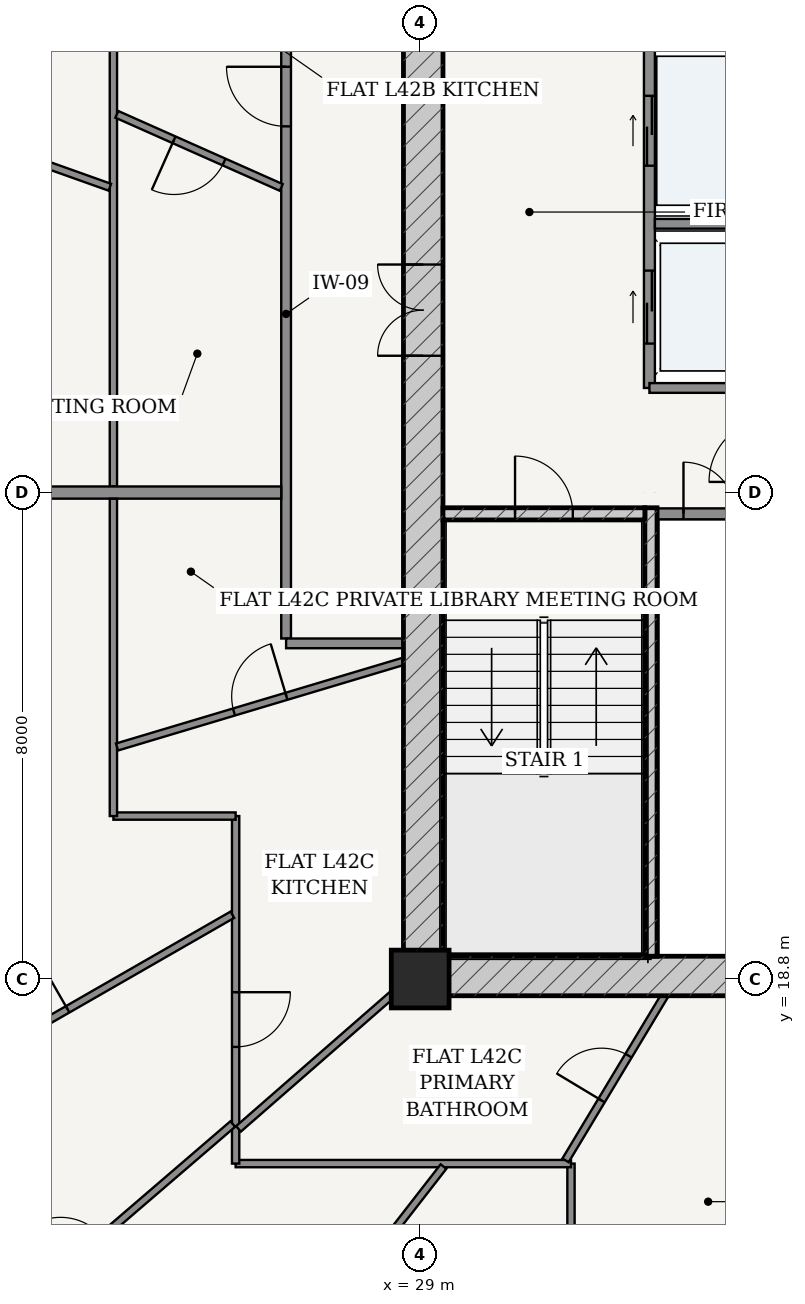
"""IFC4 building model, lengths in metres.
Left out: names, types, materials, properties, quantities, classifications, styles, units other than length and angle.
Written with IfcOpenShell. Run it as: python <this file> out.ifc"""

import sys

from ifc_helpers import new_model, si_unit, direction, frame, frame_2d, origin, origin_2d, place, context, subcontext, project, spatial, rectangle, extrude, source, transform, mapped, element, fill, save


model = new_model("IFC4")
c1 = context("Model", 3, precision=1e-05, world=origin(), true_north=direction((-0.2419218956, 0.970295726276)))
c2 = subcontext(c1, "Body", "Model", "MODEL_VIEW")
j1 = project(units=[si_unit("LENGTHUNIT", "METRE"), si_unit("PLANEANGLEUNIT", "RADIAN")], contexts=[c1])
p1 = place(None, origin())
s1 = spatial("IfcSite", under=j1, at=p1, CompositionType="ELEMENT")
p2 = place(p1, origin())
s2 = spatial("IfcBuilding", under=s1, at=p2, CompositionType="ELEMENT")
p3 = place(p2, frame((0.0, 0.0, 160.6)))
s3 = spatial("IfcBuildingStorey", under=s2, at=p3, CompositionType="ELEMENT", Elevation=160.6)
p4 = place(p3, frame((29.0, 18.8, 0.0), z_axis=(0.0, 0.0, 1.0), x_axis=(1.0, 0.0, 0.0)))
e1 = element("IfcColumn", 1, at=p4, inside=s3, PredefinedType="COLUMN", context=c2, shape_type="SweptSolid", body=[
    extrude(rectangle(XDim=0.95, YDim=0.95, at=origin_2d()), origin(), (0.0, 0.0, 1.0), 3.6),
])
p5 = place(p3, frame((28.725, 18.85, 0.0), z_axis=(0.0, 0.0, 1.0), x_axis=(1.0, 0.0, 0.0)))
e2 = element("IfcWall", 2, at=p5, inside=s3, PredefinedType="SHEAR", context=c2, shape_type="SweptSolid", body=[
    extrude(rectangle(XDim=18.55, YDim=0.65, at=frame_2d((9.275, 0.0))), origin(), (0.0, 0.0, 1.0), 3.33),
])
p6 = place(p5, frame((8.85, 0.0, 0.0)))
e3 = element("IfcOpeningElement", 3, at=p6, cuts=e2, PredefinedType="OPENING", context=c2, shape_type="SweptSolid", body=[
    extrude(rectangle(XDim=0.85, YDim=2.1, at=frame_2d((0.425, 1.05))), frame((0.0, 0.335, 0.0), z_axis=(0.0, -1.0, 0.0), x_axis=(1.0, 0.0, 0.0)), (0.0, 0.0, 1.0), 0.67),
])
p7 = place(p3, frame((29.05, 19.175, 0.0), z_axis=(0.0, 0.0, 1.0), x_axis=(0.0, 1.0, 0.0)))
e4 = element("IfcWall", 4, at=p7, inside=s3, PredefinedType="SHEAR", context=c2, shape_type="SweptSolid", body=[
    extrude(rectangle(XDim=15.25, YDim=0.65, at=frame_2d((7.625, 0.0))), origin(), (0.0, 0.0, 1.0), 3.33),
])
p8 = place(p7, frame((9.875, 0.0, 0.0)))
e5 = element("IfcOpeningElement", 5, at=p8, cuts=e4, PredefinedType="OPENING", context=c2, shape_type="SweptSolid", body=[
    extrude(rectangle(XDim=1.5, YDim=2.2, at=frame_2d((0.75, 1.1))), frame((0.0, 0.335, 0.0), z_axis=(0.0, -1.0, 0.0), x_axis=(1.0, 0.0, 0.0)), (0.0, 0.0, 1.0), 0.67),
])
p9 = place(p3, frame((32.795, 19.175, 0.0), z_axis=(0.0, 0.0, 1.0), x_axis=(0.0, 1.0, 0.0)))
e6 = element("IfcWall", 6, at=p9, inside=s3, PredefinedType="SOLIDWALL", context=c2, shape_type="SweptSolid", body=[
    extrude(rectangle(XDim=7.375, YDim=0.2, at=frame_2d((3.688, 0.0))), origin(), (0.0, 0.0, 1.0), 3.33),
])
p10 = place(p3, frame((29.375, 26.45, 0.0), z_axis=(0.0, 0.0, 1.0), x_axis=(1.0, 0.0, 0.0)))
e7 = element("IfcWall", 7, at=p10, inside=s3, PredefinedType="SOLIDWALL", context=c2, shape_type="SweptSolid", body=[
    extrude(rectangle(XDim=3.32, YDim=0.2, at=frame_2d((1.66, 0.0))), origin(), (0.0, 0.0, 1.0), 3.33),
])
p11 = place(p10, frame((1.185, 0.0, 0.0)))
e8 = element("IfcOpeningElement", 8, at=p11, cuts=e7, PredefinedType="OPENING", context=c2, shape_type="SweptSolid", body=[
    extrude(rectangle(XDim=0.95, YDim=2.15, at=frame_2d((0.475, 1.075))), frame((0.0, 0.11, 0.0), z_axis=(0.0, -1.0, 0.0), x_axis=(1.0, 0.0, 0.0)), (0.0, 0.0, 1.0), 0.22),
])
p12 = place(p3, frame((32.9, 26.45, 0.0), z_axis=(0.0, 0.0, 1.0), x_axis=(1.0, 0.0, 0.0)))
e9 = element("IfcWall", 9, at=p12, inside=s3, PredefinedType="PARTITIONING", context=c2, shape_type="SweptSolid", body=[
    extrude(rectangle(XDim=1.71, YDim=0.18, at=frame_2d((0.855, 0.0))), origin(), (0.0, 0.0, 1.0), 3.33),
])
p13 = place(p12, frame((0.43, 0.0, 0.0)))
e10 = element("IfcOpeningElement", 10, at=p13, cuts=e9, PredefinedType="OPENING", context=c2, shape_type="SweptSolid", body=[
    extrude(rectangle(XDim=0.85, YDim=2.1, at=frame_2d((0.425, 1.05))), frame((0.0, 0.1, 0.0), z_axis=(0.0, -1.0, 0.0), x_axis=(1.0, 0.0, 0.0)), (0.0, 0.0, 1.0), 0.2),
])
p14 = place(p3, frame((32.77, 28.52, 0.0), z_axis=(0.0, 0.0, 1.0), x_axis=(0.0, 1.0, 0.0)))
e11 = element("IfcWall", 11, at=p14, inside=s3, PredefinedType="PARTITIONING", context=c2, shape_type="SweptSolid", body=[
    extrude(rectangle(XDim=5.905, YDim=0.18, at=frame_2d((2.953, 0.0))), origin(), (0.0, 0.0, 1.0), 3.33),
])
p15 = place(p14, frame((3.655, 0.0, 0.0)))
e12 = element("IfcOpeningElement", 12, at=p15, cuts=e11, PredefinedType="OPENING", context=c2, shape_type="SweptSolid", body=[
    extrude(rectangle(XDim=1.15, YDim=2.2, at=frame_2d((0.575, 1.1))), frame((0.0, 0.1, 0.0), z_axis=(0.0, -1.0, 0.0), x_axis=(1.0, 0.0, 0.0)), (0.0, 0.0, 1.0), 0.2),
])
p16 = place(p14, frame((0.73, 0.0, 0.0)))
e13 = element("IfcOpeningElement", 13, at=p16, cuts=e11, PredefinedType="OPENING", context=c2, shape_type="SweptSolid", body=[
    extrude(rectangle(XDim=1.2, YDim=2.25, at=frame_2d((0.6, 1.125))), frame((0.0, 0.1, 0.0), z_axis=(0.0, -1.0, 0.0), x_axis=(1.0, 0.0, 0.0)), (0.0, 0.0, 1.0), 0.2),
])
p17 = place(p3, frame((32.86, 31.22, 0.0), z_axis=(0.0, 0.0, 1.0), x_axis=(1.0, 0.0, 0.0)))
e14 = element("IfcWall", 14, at=p17, inside=s3, PredefinedType="PARTITIONING", context=c2, shape_type="SweptSolid", body=[
    extrude(rectangle(XDim=1.75, YDim=0.16, at=frame_2d((0.875, 0.0))), origin(), (0.0, 0.0, 1.0), 3.33),
])
p18 = place(p3, frame((32.77, 28.52, 0.0), z_axis=(0.0, 0.0, 1.0), x_axis=(1.0, 0.0, 0.0)))
e15 = element("IfcWall", 15, at=p18, inside=s3, PredefinedType="PARTITIONING", context=c2, shape_type="SweptSolid", body=[
    extrude(rectangle(XDim=1.84, YDim=0.16, at=frame_2d((0.92, 0.0))), origin(), (0.0, 0.0, 1.0), 3.33),
])
p19 = place(p3, frame((26.795, 24.4, 0.0), z_axis=(0.0, 0.0, 1.0), x_axis=(0.0, 1.0, 0.0)))
e16 = element("IfcWall", 16, at=p19, inside=s3, PredefinedType="PARTITIONING", context=c2, shape_type="SweptSolid", body=[
    extrude(rectangle(XDim=10.675, YDim=0.16, at=frame_2d((5.337, 0.0))), origin(), (0.0, 0.0, 1.0), 2.776),
])
p20 = place(p19, frame((8.422, 0.0, 0.0)))
e17 = element("IfcOpeningElement", 17, at=p20, cuts=e16, PredefinedType="OPENING", context=c2, shape_type="SweptSolid", body=[
    extrude(rectangle(XDim=0.98, YDim=2.2, at=frame_2d((0.49, 1.1))), frame((0.0, 0.09, 0.0), z_axis=(0.0, -1.0, 0.0), x_axis=(1.0, 0.0, 0.0)), (0.0, 0.0, 1.0), 0.18),
])
p21 = place(p3, frame((26.795, 24.32, 0.0), z_axis=(0.0, 0.0, 1.0), x_axis=(1.0, 0.0, 0.0)))
e18 = element("IfcWall", 18, at=p21, inside=s3, PredefinedType="PARTITIONING", context=c2, shape_type="SweptSolid", body=[
    extrude(rectangle(XDim=1.93, YDim=0.16, at=frame_2d((0.965, 0.0))), origin(), (0.0, 0.0, 1.0), 3.33),
])
p22 = place(p3, frame((23.955, 26.902, 0.0), z_axis=(0.0, 0.0, 1.0), x_axis=(0.0, 1.0, 0.0)))
e19 = element("IfcWall", 19, at=p22, inside=s3, PredefinedType="PARTITIONING", context=c2, shape_type="SweptSolid", body=[
    extrude(rectangle(XDim=11.093, YDim=0.12, at=frame_2d((5.546, 0.0))), origin(), (0.0, 0.0, 1.0), 2.776),
])
p23 = place(p22, frame((7.997, 0.0, 0.0)))
e20 = element("IfcOpeningElement", 20, at=p23, cuts=e19, PredefinedType="OPENING", context=c2, shape_type="SweptSolid", body=[
    extrude(rectangle(XDim=0.9, YDim=2.15, at=frame_2d((0.45, 1.075))), frame((0.0, 0.07, 0.0), z_axis=(0.0, -1.0, 0.0), x_axis=(1.0, 0.0, 0.0)), (0.0, 0.0, 1.0), 0.14),
])
p24 = place(p3, frame((23.896, 31.821, 0.0), z_axis=(0.0, 0.0, 1.0), x_axis=(-0.942072876428, 0.335408251983, 0.0)))
e21 = element("IfcWall", 21, at=p24, inside=s3, PredefinedType="PARTITIONING", context=c2, shape_type="SweptSolid", body=[
    extrude(rectangle(XDim=8.7, YDim=0.12, at=frame_2d((4.35, 0.0))), origin(), (0.0, 0.0, 1.0), 2.846),
])
p25 = place(p24, frame((3.9, 0.0, 0.0)))
e22 = element("IfcOpeningElement", 22, at=p25, cuts=e21, PredefinedType="OPENING", context=c2, shape_type="SweptSolid", body=[
    extrude(rectangle(XDim=0.9, YDim=2.15, at=frame_2d((0.45, 1.075))), frame((0.0, 0.07, 0.0), z_axis=(0.0, -1.0, 0.0), x_axis=(1.0, 0.0, 0.0)), (0.0, 0.0, 1.0), 0.14),
])
p26 = place(p3, frame((26.715, 31.818, 0.0), z_axis=(0.0, 0.0, 1.0), x_axis=(-0.91376049718, 0.406253312347, 0.0)))
e23 = element("IfcWall", 23, at=p26, inside=s3, PredefinedType="PARTITIONING", context=c2, shape_type="SweptSolid", body=[
    extrude(rectangle(XDim=2.958, YDim=0.12, at=frame_2d((1.479, 0.0))), origin(), (0.0, 0.0, 1.0), 3.33),
])
p27 = place(p26, frame((1.029, 0.0, 0.0)))
e24 = element("IfcOpeningElement", 24, at=p27, cuts=e23, PredefinedType="OPENING", context=c2, shape_type="SweptSolid", body=[
    extrude(rectangle(XDim=0.9, YDim=2.15, at=frame_2d((0.45, 1.075))), frame((0.0, 0.07, 0.0), z_axis=(0.0, -1.0, 0.0), x_axis=(1.0, 0.0, 0.0)), (0.0, 0.0, 1.0), 0.14),
])
p28 = place(p3, frame((26.715, 26.8, 0.0), z_axis=(0.0, 0.0, 1.0), x_axis=(-1.0, 0.0, 0.0)))
e25 = element("IfcWall", 25, at=p28, inside=s3, PredefinedType="PARTITIONING", context=c2, shape_type="SweptSolid", body=[
    extrude(rectangle(XDim=12.855, YDim=0.2, at=frame_2d((6.427, 0.0))), origin(), (0.0, 0.0, 1.0), 2.846),
])
p29 = place(p3, frame((31.48, 13.755, 0.0), z_axis=(0.0, 0.0, 1.0), x_axis=(0.0, 1.0, 0.0)))
e26 = element("IfcWall", 26, at=p29, inside=s3, PredefinedType="PARTITIONING", context=c2, shape_type="SweptSolid", body=[
    extrude(rectangle(XDim=2.01, YDim=0.12, at=frame_2d((1.005, 0.0))), origin(), (0.0, 0.0, 1.0), 3.005),
])
p30 = place(p3, frame((31.48, 15.765, 0.0), z_axis=(0.0, 0.0, 1.0), x_axis=(-1.0, 0.0, 0.0)))
e27 = element("IfcWall", 27, at=p30, inside=s3, PredefinedType="PARTITIONING", context=c2, shape_type="SweptSolid", body=[
    extrude(rectangle(XDim=5.515, YDim=0.12, at=frame_2d((2.757, 0.0))), origin(), (0.0, 0.0, 1.0), 2.776),
])
p31 = place(p3, frame((25.965, 15.765, 0.0), z_axis=(0.0, 0.0, 1.0), x_axis=(0.0, 1.0, 0.0)))
e28 = element("IfcWall", 28, at=p31, inside=s3, PredefinedType="PARTITIONING", context=c2, shape_type="SweptSolid", body=[
    extrude(rectangle(XDim=5.715, YDim=0.12, at=frame_2d((2.857, 0.0))), origin(), (0.0, 0.0, 1.0), 2.776),
])
p32 = place(p31, frame((1.919, 0.0, 0.0)))
e29 = element("IfcOpeningElement", 29, at=p32, cuts=e28, PredefinedType="OPENING", context=c2, shape_type="SweptSolid", body=[
    extrude(rectangle(XDim=0.9, YDim=2.15, at=frame_2d((0.45, 1.075))), frame((0.0, 0.07, 0.0), z_axis=(0.0, -1.0, 0.0), x_axis=(1.0, 0.0, 0.0)), (0.0, 0.0, 1.0), 0.14),
])
p33 = place(p3, frame((25.965, 21.48, 0.0), z_axis=(0.0, 0.0, 1.0), x_axis=(-1.0, 0.0, 0.0)))
e30 = element("IfcWall", 30, at=p33, inside=s3, PredefinedType="PARTITIONING", context=c2, shape_type="SweptSolid", body=[
    extrude(rectangle(XDim=2.01, YDim=0.12, at=frame_2d((1.005, 0.0))), origin(), (0.0, 0.0, 1.0), 3.33),
])
p34 = place(p3, frame((23.955, 21.48, 0.0), z_axis=(0.0, 0.0, 1.0), x_axis=(0.0, 1.0, 0.0)))
e31 = element("IfcWall", 31, at=p34, inside=s3, PredefinedType="PARTITIONING", context=c2, shape_type="SweptSolid", body=[
    extrude(rectangle(XDim=5.218, YDim=0.12, at=frame_2d((2.609, 0.0))), origin(), (0.0, 0.0, 1.0), 2.776),
])
p35 = place(p3, frame((25.911, 19.857, 0.0), z_axis=(0.0, 0.0, 1.0), x_axis=(-0.867160939672, -0.498028015986, 0.0)))
e32 = element("IfcWall", 32, at=p35, inside=s3, PredefinedType="PARTITIONING", context=c2, shape_type="SweptSolid", body=[
    extrude(rectangle(XDim=9.152, YDim=0.12, at=frame_2d((4.576, 0.0))), origin(), (0.0, 0.0, 1.0), 2.776),
])
p36 = place(p35, frame((3.124, 0.0, 0.0)))
e33 = element("IfcOpeningElement", 33, at=p36, cuts=e32, PredefinedType="OPENING", context=c2, shape_type="SweptSolid", body=[
    extrude(rectangle(XDim=0.9, YDim=2.15, at=frame_2d((0.45, 1.075))), frame((0.0, 0.07, 0.0), z_axis=(0.0, -1.0, 0.0), x_axis=(1.0, 0.0, 0.0)), (0.0, 0.0, 1.0), 0.14),
])
p37 = place(p3, frame((25.918, 16.416, 0.0), z_axis=(0.0, 0.0, 1.0), x_axis=(-0.758356041353, -0.651840559142, 0.0)))
e34 = element("IfcWall", 34, at=p37, inside=s3, PredefinedType="PARTITIONING", context=c2, shape_type="SweptSolid", body=[
    extrude(rectangle(XDim=6.569, YDim=0.12, at=frame_2d((3.285, 0.0))), origin(), (0.0, 0.0, 1.0), 2.846),
])
p38 = place(p37, frame((2.834, 0.0, 0.0)))
e35 = element("IfcOpeningElement", 35, at=p38, cuts=e34, PredefinedType="OPENING", context=c2, shape_type="SweptSolid", body=[
    extrude(rectangle(XDim=0.9, YDim=2.15, at=frame_2d((0.45, 1.075))), frame((0.0, 0.07, 0.0), z_axis=(0.0, -1.0, 0.0), x_axis=(1.0, 0.0, 0.0)), (0.0, 0.0, 1.0), 0.14),
])
p39 = place(p3, frame((29.383, 15.716, 0.0), z_axis=(0.0, 0.0, 1.0), x_axis=(-0.613751061882, -0.789499609904, 0.0)))
e36 = element("IfcWall", 36, at=p39, inside=s3, PredefinedType="PARTITIONING", context=c2, shape_type="SweptSolid", body=[
    extrude(rectangle(XDim=7.758, YDim=0.12, at=frame_2d((3.879, 0.0))), origin(), (0.0, 0.0, 1.0), 2.776),
])
p40 = place(p39, frame((2.426, 0.0, 0.0)))
e37 = element("IfcOpeningElement", 37, at=p40, cuts=e36, PredefinedType="OPENING", context=c2, shape_type="SweptSolid", body=[
    extrude(rectangle(XDim=0.9, YDim=2.15, at=frame_2d((0.45, 1.075))), frame((0.0, 0.07, 0.0), z_axis=(0.0, -1.0, 0.0), x_axis=(1.0, 0.0, 0.0)), (0.0, 0.0, 1.0), 0.14),
])
p41 = place(p3, frame((28.723, 24.025, 0.0), z_axis=(0.0, 0.0, 1.0), x_axis=(-0.958046115523, -0.286614096882, 0.0)))
e38 = element("IfcWall", 38, at=p41, inside=s3, PredefinedType="PARTITIONING", context=c2, shape_type="SweptSolid", body=[
    extrude(rectangle(XDim=4.915, YDim=0.12, at=frame_2d((2.458, 0.0))), origin(), (0.0, 0.0, 1.0), 3.33),
])
p42 = place(p41, frame((2.007, 0.0, 0.0)))
e39 = element("IfcOpeningElement", 39, at=p42, cuts=e38, PredefinedType="OPENING", context=c2, shape_type="SweptSolid", body=[
    extrude(rectangle(XDim=0.9, YDim=2.15, at=frame_2d((0.45, 1.075))), frame((0.0, 0.07, 0.0), z_axis=(0.0, -1.0, 0.0), x_axis=(1.0, 0.0, 0.0)), (0.0, 0.0, 1.0), 0.14),
])
p43 = place(p3, frame((28.588, 18.585, 0.0), z_axis=(0.0, 0.0, 1.0), x_axis=(-0.753380933673, -0.657584343471, 0.0)))
e40 = element("IfcWall", 40, at=p43, inside=s3, PredefinedType="PARTITIONING", context=c2, shape_type="SweptSolid", body=[
    extrude(rectangle(XDim=3.42, YDim=0.12, at=frame_2d((1.71, 0.0))), origin(), (0.0, 0.0, 1.0), 3.005),
])
p44 = place(p3, frame((33.02, 18.525, 0.0), z_axis=(0.0, 0.0, 1.0), x_axis=(-0.515677168, -0.856782970421, 0.0)))
e41 = element("IfcWall", 41, at=p44, inside=s3, PredefinedType="PARTITIONING", context=c2, shape_type="SweptSolid", body=[
    extrude(rectangle(XDim=3.159, YDim=0.12, at=frame_2d((1.58, 0.0))), origin(), (0.0, 0.0, 1.0), 3.33),
])
p45 = place(p44, frame((1.15, 0.0, 0.0)))
e42 = element("IfcOpeningElement", 42, at=p45, cuts=e41, PredefinedType="OPENING", context=c2, shape_type="SweptSolid", body=[
    extrude(rectangle(XDim=0.86, YDim=2.15, at=frame_2d((0.43, 1.075))), frame((0.0, 0.07, 0.0), z_axis=(0.0, -1.0, 0.0), x_axis=(1.0, 0.0, 0.0)), (0.0, 0.0, 1.0), 0.14),
])
m1 = source(origin(), c2, "Body", "SweptSolid", [
    extrude(rectangle(XDim=1.5, YDim=2.2, at=frame_2d((0.75, 1.1))), frame((0.0, 0.025, 0.0), z_axis=(0.0, -1.0, 0.0), x_axis=(1.0, 0.0, 0.0)), (0.0, 0.0, 1.0), 0.05),
])
p46 = place(p8, origin())
e43 = element("IfcDoor", 43, at=p46, inside=s3, OperationType="DOUBLE_DOOR_SINGLE_SWING", PredefinedType="DOOR", context=c2, shape_type="MappedRepresentation", body=[
    mapped(m1, transform((0.0, 0.0, 0.0), scale=1.0)),
])
fill(e5, e43)
m2 = source(origin(), c2, "Body", "SweptSolid", [
    extrude(rectangle(XDim=0.95, YDim=2.15, at=frame_2d((0.475, 1.075))), frame((0.0, 0.025, 0.0), z_axis=(0.0, -1.0, 0.0), x_axis=(1.0, 0.0, 0.0)), (0.0, 0.0, 1.0), 0.05),
])
p47 = place(p11, origin())
e44 = element("IfcDoor", 44, at=p47, inside=s3, OperationType="SINGLE_SWING_LEFT", PredefinedType="DOOR", context=c2, shape_type="MappedRepresentation", body=[
    mapped(m2, transform((0.0, 0.0, 0.0), scale=1.0)),
])
fill(e8, e44)
m3 = source(origin(), c2, "Body", "SweptSolid", [
    extrude(rectangle(XDim=0.85, YDim=2.1, at=frame_2d((0.425, 1.05))), frame((0.0, 0.025, 0.0), z_axis=(0.0, -1.0, 0.0), x_axis=(1.0, 0.0, 0.0)), (0.0, 0.0, 1.0), 0.05),
])
p48 = place(p13, origin())
e45 = element("IfcDoor", 45, at=p48, inside=s3, OperationType="SINGLE_SWING_LEFT", PredefinedType="DOOR", context=c2, shape_type="MappedRepresentation", body=[
    mapped(m3, transform((0.0, 0.0, 0.0), scale=1.0)),
])
fill(e10, e45)
m4 = source(origin(), c2, "Body", "SweptSolid", [
    extrude(rectangle(XDim=1.15, YDim=2.2, at=frame_2d((0.575, 1.1))), frame((0.0, 0.025, 0.0), z_axis=(0.0, -1.0, 0.0), x_axis=(1.0, 0.0, 0.0)), (0.0, 0.0, 1.0), 0.05),
])
p49 = place(p15, origin())
e46 = element("IfcDoor", 46, at=p49, inside=s3, OperationType="DOUBLE_DOOR_SLIDING", PredefinedType="DOOR", context=c2, shape_type="MappedRepresentation", body=[
    mapped(m4, transform((0.0, 0.0, 0.0), scale=1.0)),
])
fill(e12, e46)
m5 = source(origin(), c2, "Body", "SweptSolid", [
    extrude(rectangle(XDim=1.2, YDim=2.25, at=frame_2d((0.6, 1.125))), frame((0.0, 0.025, 0.0), z_axis=(0.0, -1.0, 0.0), x_axis=(1.0, 0.0, 0.0)), (0.0, 0.0, 1.0), 0.05),
])
p50 = place(p16, origin())
e47 = element("IfcDoor", 47, at=p50, inside=s3, OperationType="DOUBLE_DOOR_SLIDING", PredefinedType="DOOR", context=c2, shape_type="MappedRepresentation", body=[
    mapped(m5, transform((0.0, 0.0, 0.0), scale=1.0)),
])
fill(e13, e47)
m6 = source(origin(), c2, "Body", "SweptSolid", [
    extrude(rectangle(XDim=0.98, YDim=2.2, at=frame_2d((0.49, 1.1))), frame((0.0, 0.025, 0.0), z_axis=(0.0, -1.0, 0.0), x_axis=(1.0, 0.0, 0.0)), (0.0, 0.0, 1.0), 0.05),
])
p51 = place(p20, origin())
e48 = element("IfcDoor", 48, at=p51, inside=s3, OperationType="SINGLE_SWING_RIGHT", PredefinedType="DOOR", context=c2, shape_type="MappedRepresentation", body=[
    mapped(m6, transform((0.0, 0.0, 0.0), scale=1.0)),
])
fill(e17, e48)
m7 = source(origin(), c2, "Body", "SweptSolid", [
    extrude(rectangle(XDim=0.9, YDim=2.15, at=frame_2d((0.45, 1.075))), frame((0.0, 0.025, 0.0), z_axis=(0.0, -1.0, 0.0), x_axis=(1.0, 0.0, 0.0)), (0.0, 0.0, 1.0), 0.05),
])
p52 = place(p27, origin())
e49 = element("IfcDoor", 49, at=p52, inside=s3, OperationType="SINGLE_SWING_RIGHT", PredefinedType="DOOR", context=c2, shape_type="MappedRepresentation", body=[
    mapped(m7, transform((0.0, 0.0, 0.0), scale=1.0)),
])
fill(e24, e49)
m8 = source(origin(), c2, "Body", "SweptSolid", [
    extrude(rectangle(XDim=0.86, YDim=2.15, at=frame_2d((0.43, 1.075))), frame((0.0, 0.025, 0.0), z_axis=(0.0, -1.0, 0.0), x_axis=(1.0, 0.0, 0.0)), (0.0, 0.0, 1.0), 0.05),
])
p53 = place(p45, frame((0.86, 0.0, 0.0), z_axis=(0.0, 0.0, 1.0), x_axis=(-1.0, 0.0, 0.0)))
e50 = element("IfcDoor", 50, at=p53, inside=s3, OperationType="SINGLE_SWING_LEFT", PredefinedType="DOOR", context=c2, shape_type="MappedRepresentation", body=[
    mapped(m8, transform((0.0, 0.0, 0.0), scale=1.0)),
])
fill(e42, e50)
p54 = place(p36, frame((0.9, 0.0, 0.0), z_axis=(0.0, 0.0, 1.0), x_axis=(-1.0, 0.0, 0.0)))
e51 = element("IfcDoor", 51, at=p54, inside=s3, OperationType="SINGLE_SWING_RIGHT", PredefinedType="DOOR", context=c2, shape_type="MappedRepresentation", body=[
    mapped(m7, transform((0.0, 0.0, 0.0), scale=1.0)),
])
fill(e33, e51)
p55 = place(p32, frame((0.9, 0.0, 0.0), z_axis=(0.0, 0.0, 1.0), x_axis=(-1.0, 0.0, 0.0)))
e52 = element("IfcDoor", 52, at=p55, inside=s3, OperationType="SINGLE_SWING_LEFT", PredefinedType="DOOR", context=c2, shape_type="MappedRepresentation", body=[
    mapped(m7, transform((0.0, 0.0, 0.0), scale=1.0)),
])
fill(e29, e52)
p56 = place(p42, frame((0.9, 0.0, 0.0), z_axis=(0.0, 0.0, 1.0), x_axis=(-1.0, 0.0, 0.0)))
e53 = element("IfcDoor", 53, at=p56, inside=s3, OperationType="SINGLE_SWING_RIGHT", PredefinedType="DOOR", context=c2, shape_type="MappedRepresentation", body=[
    mapped(m7, transform((0.0, 0.0, 0.0), scale=1.0)),
])
fill(e39, e53)
save(model, sys.argv[1])
